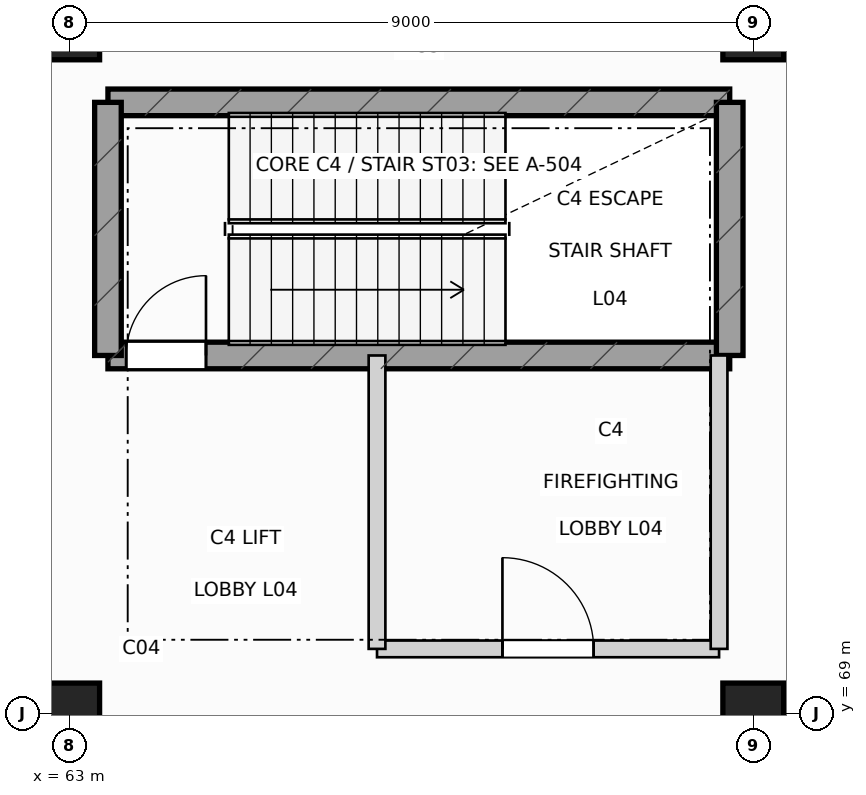
"""IFC4 building model, lengths in metres.
Left out: names, types, materials, properties, quantities, classifications, styles, units other than length and angle.
Written with IfcOpenShell. Run it as: python <this file> out.ifc"""

import sys

from ifc_helpers import new_model, si_unit, direction, frame, frame_2d, origin, origin_2d, place, context, subcontext, project, spatial, rectangle, extrude, element, fill, save


model = new_model("IFC4")
c1 = context("Model", 3, precision=1e-05, world=origin(), true_north=direction((0.0, 1.0)))
c2 = subcontext(c1, "Body", "Model", "MODEL_VIEW")
j1 = project(units=[si_unit("LENGTHUNIT", "METRE"), si_unit("PLANEANGLEUNIT", "RADIAN")], contexts=[c1])
p1 = place(None, origin())
s1 = spatial("IfcSite", under=j1, at=p1, CompositionType="ELEMENT")
p2 = place(p1, origin())
s2 = spatial("IfcBuilding", under=s1, at=p2, CompositionType="ELEMENT")
p3 = place(p2, frame((0.0, 0.0, 21.6)))
s3 = spatial("IfcBuildingStorey", under=s2, at=p3, CompositionType="ELEMENT", Elevation=21.6)
for number, where, z_axis, x_axis in (
    (1, (63.0, 69.0, 0.0), (0.0, 0.0, 1.0), (1.0, 0.0, 0.0)),
    (2, (63.0, 78.0, 0.0), (0.0, 0.0, 1.0), (1.0, 0.0, 0.0)),
    (3, (72.0, 69.0, 0.0), (0.0, 0.0, 1.0), (1.0, 0.0, 0.0)),
    (4, (72.0, 78.0, 0.0), (0.0, 0.0, 1.0), (1.0, 0.0, 0.0)),
):
    element("IfcColumn", number, at=place(p3, frame(where, z_axis=z_axis, x_axis=x_axis)), inside=s3, PredefinedType="COLUMN", context=c2, shape_type="SweptSolid", body=[
        extrude(rectangle(XDim=0.8, YDim=0.8, at=origin_2d()), origin(), (0.0, 0.0, 1.0), 4.8),
    ])
p4 = place(p3, frame((63.51, 73.71, 0.0), z_axis=(0.0, 0.0, 1.0), x_axis=(1.0, 0.0, 0.0)))
e5 = element("IfcWall", 5, at=p4, inside=s3, PredefinedType="SHEAR", context=c2, shape_type="SweptSolid", body=[
    extrude(rectangle(XDim=8.18, YDim=0.35, at=frame_2d((4.09, 0.0))), origin(), (0.0, 0.0, 1.0), 4.54),
])
p5 = place(p4, frame((0.24, 0.0, 0.0)))
e6 = element("IfcOpeningElement", 6, at=p5, cuts=e5, PredefinedType="OPENING", context=c2, shape_type="SweptSolid", body=[
    extrude(rectangle(XDim=1.05, YDim=2.18, at=frame_2d((0.525, 1.09))), frame((0.0, 0.185, 0.0), z_axis=(0.0, -1.0, 0.0), x_axis=(1.0, 0.0, 0.0)), (0.0, 0.0, 1.0), 0.37),
])
p6 = place(p3, frame((63.51, 77.04, 0.0), z_axis=(0.0, 0.0, 1.0), x_axis=(1.0, 0.0, 0.0)))
e7 = element("IfcWall", 7, at=p6, inside=s3, PredefinedType="SHEAR", context=c2, shape_type="SweptSolid", body=[
    extrude(rectangle(XDim=8.18, YDim=0.35, at=frame_2d((4.09, 0.0))), origin(), (0.0, 0.0, 1.0), 4.54),
])
for number, where, z_axis, x_axis in (
    (8, (63.51, 73.71, 0.0), (0.0, 0.0, 1.0), (0.0, 1.0, 0.0)),
    (9, (71.69, 73.71, 0.0), (0.0, 0.0, 1.0), (0.0, 1.0, 0.0)),
):
    element("IfcWall", number, at=place(p3, frame(where, z_axis=z_axis, x_axis=x_axis)), inside=s3, PredefinedType="SHEAR", context=c2, shape_type="SweptSolid", body=[
        extrude(rectangle(XDim=3.33, YDim=0.35, at=frame_2d((1.665, 0.0))), origin(), (0.0, 0.0, 1.0), 4.54),
    ])
p7 = place(p3, frame((67.05, 69.85, 0.0), z_axis=(0.0, 0.0, 1.0), x_axis=(1.0, 0.0, 0.0)))
e10 = element("IfcWall", 10, at=p7, inside=s3, PredefinedType="PARTITIONING", context=c2, shape_type="SweptSolid", body=[
    extrude(rectangle(XDim=4.5, YDim=0.22, at=frame_2d((2.25, 0.0))), origin(), (0.0, 0.0, 1.0), 3.905),
])
p8 = place(p7, frame((1.65, 0.0, 0.0)))
e11 = element("IfcOpeningElement", 11, at=p8, cuts=e10, PredefinedType="OPENING", context=c2, shape_type="SweptSolid", body=[
    extrude(rectangle(XDim=1.2, YDim=2.18, at=frame_2d((0.6, 1.09))), frame((0.0, 0.12, 0.0), z_axis=(0.0, -1.0, 0.0), x_axis=(1.0, 0.0, 0.0)), (0.0, 0.0, 1.0), 0.24),
])
p9 = place(p3, frame((67.05, 69.85, 0.0), z_axis=(0.0, 0.0, 1.0), x_axis=(0.0, 1.0, 0.0)))
e12 = element("IfcWall", 12, at=p9, inside=s3, PredefinedType="PARTITIONING", context=c2, shape_type="SweptSolid", body=[
    extrude(rectangle(XDim=3.86, YDim=0.22, at=frame_2d((1.93, 0.0))), origin(), (0.0, 0.0, 1.0), 4.205),
])
p10 = place(p3, frame((71.55, 69.85, 0.0), z_axis=(0.0, 0.0, 1.0), x_axis=(0.0, 1.0, 0.0)))
e13 = element("IfcWall", 13, at=p10, inside=s3, PredefinedType="PARTITIONING", context=c2, shape_type="SweptSolid", body=[
    extrude(rectangle(XDim=3.86, YDim=0.22, at=frame_2d((1.93, 0.0))), origin(), (0.0, 0.0, 1.0), 3.905),
])
p11 = place(p5, origin())
e14 = element("IfcDoor", 14, at=p11, inside=s3, OperationType="SINGLE_SWING_RIGHT", PredefinedType="DOOR", context=c2, shape_type="SweptSolid", body=[
    extrude(rectangle(XDim=1.05, YDim=2.18, at=frame_2d((0.525, 1.09))), frame((0.0, 0.025, 0.0), z_axis=(0.0, -1.0, 0.0), x_axis=(1.0, 0.0, 0.0)), (0.0, 0.0, 1.0), 0.05),
])
fill(e6, e14)
p12 = place(p8, origin())
e15 = element("IfcDoor", 15, at=p12, inside=s3, OperationType="SINGLE_SWING_LEFT", PredefinedType="DOOR", context=c2, shape_type="SweptSolid", body=[
    extrude(rectangle(XDim=1.2, YDim=2.18, at=frame_2d((0.6, 1.09))), frame((0.0, 0.025, 0.0), z_axis=(0.0, -1.0, 0.0), x_axis=(1.0, 0.0, 0.0)), (0.0, 0.0, 1.0), 0.05),
])
fill(e11, e15)
save(model, sys.argv[1])
